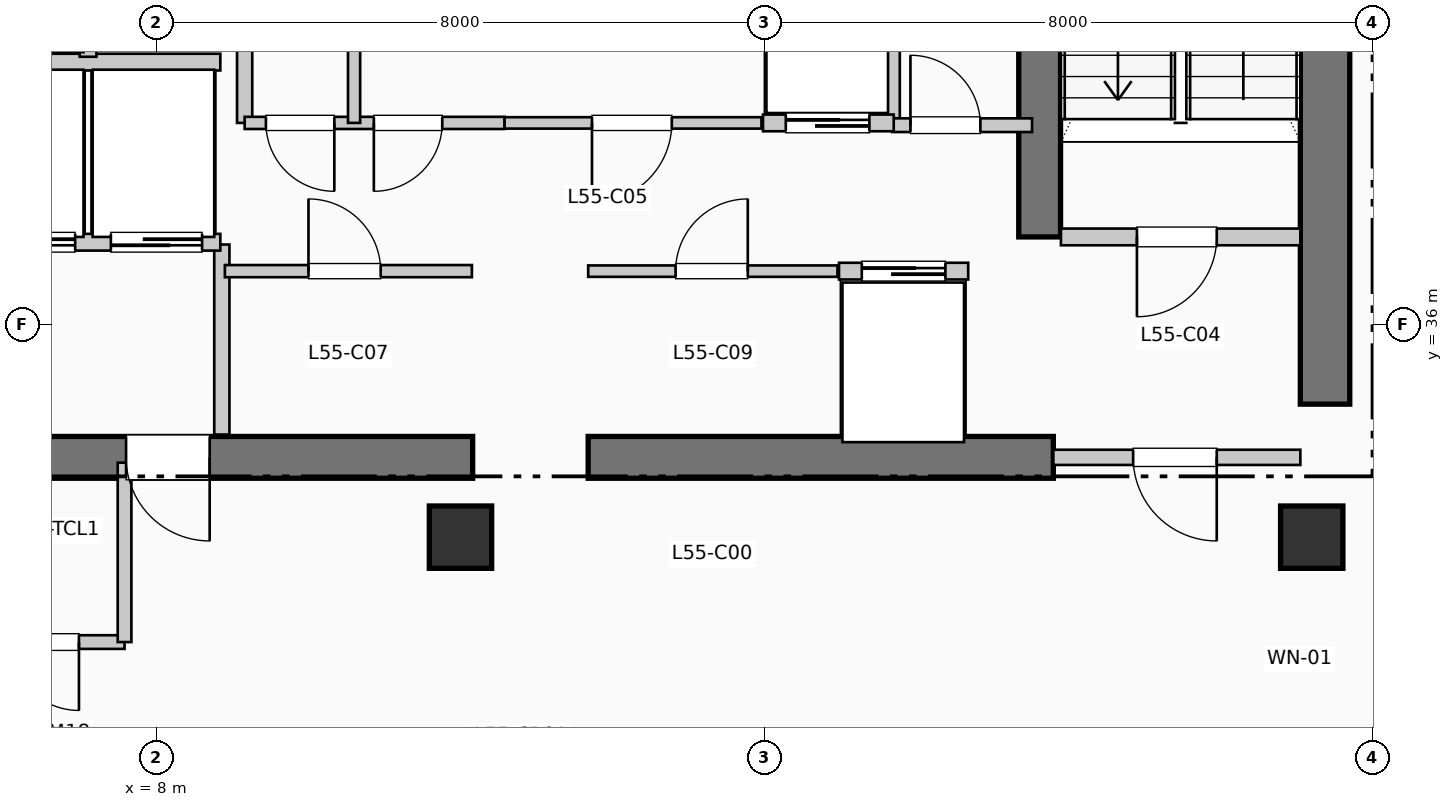
"""IFC4 building model, lengths in metres.
Left out: names, types, materials, properties, quantities, classifications, styles, units other than length and angle.
Written with IfcOpenShell. Run it as: python <this file> out.ifc"""

import sys

from ifc_helpers import new_model, si_unit, direction, frame, frame_2d, origin, origin_2d, place, context, subcontext, project, spatial, rectangle, extrude, element, fill, save


model = new_model("IFC4")
c1 = context("Model", 3, precision=1e-05, world=origin(), true_north=direction((0.0, 1.0)))
c2 = subcontext(c1, "Body", "Model", "MODEL_VIEW")
j1 = project(units=[si_unit("LENGTHUNIT", "METRE"), si_unit("PLANEANGLEUNIT", "RADIAN")], contexts=[c1])
p1 = place(None, origin())
s1 = spatial("IfcSite", under=j1, at=p1, CompositionType="ELEMENT")
p2 = place(p1, origin())
s2 = spatial("IfcBuilding", under=s1, at=p2, CompositionType="ELEMENT")
p3 = place(p2, frame((0.0, 0.0, 227.7)))
s3 = spatial("IfcBuildingStorey", under=s2, at=p3, CompositionType="ELEMENT", Elevation=227.7)
p4 = place(p3, frame((23.375, 34.95, 0.0), z_axis=(0.0, 0.0, 1.0), x_axis=(0.0, 1.0, 0.0)))
e1 = element("IfcWall", 1, at=p4, inside=s3, PredefinedType="SHEAR", context=c2, shape_type="SweptSolid", body=[
    extrude(rectangle(XDim=10.64, YDim=0.65, at=frame_2d((5.32, 0.0))), origin(), (0.0, 0.0, 1.0), 3.96),
])
p5 = place(p3, frame((1.45, 34.25, 0.0), z_axis=(0.0, 0.0, 1.0), x_axis=(1.0, 0.0, 0.0)))
e2 = element("IfcWall", 2, at=p5, inside=s3, PredefinedType="SHEAR", context=c2, shape_type="SweptSolid", body=[
    extrude(rectangle(XDim=10.71, YDim=0.55, at=frame_2d((5.355, 0.0))), origin(), (0.0, 0.0, 1.0), 3.96),
])
p6 = place(p5, frame((7.25, 0.0, 0.0), z_axis=(0.0, 0.0, 1.0), x_axis=(-1.0, 0.0, 0.0)))
e3 = element("IfcOpeningElement", 3, at=p6, cuts=e2, PredefinedType="OPENING", context=c2, shape_type="SweptSolid", body=[
    extrude(rectangle(XDim=1.1, YDim=2.15, at=frame_2d((0.55, 1.075))), frame((0.0, 0.285, 0.0), z_axis=(0.0, -1.0, 0.0), x_axis=(1.0, 0.0, 0.0)), (0.0, 0.0, 1.0), 0.57),
])
p7 = place(p3, frame((13.68, 34.25, 0.0), z_axis=(0.0, 0.0, 1.0), x_axis=(1.0, 0.0, 0.0)))
e4 = element("IfcWall", 4, at=p7, inside=s3, PredefinedType="SHEAR", context=c2, shape_type="SweptSolid", body=[
    extrude(rectangle(XDim=6.12, YDim=0.55, at=frame_2d((3.06, 0.0))), origin(), (0.0, 0.0, 1.0), 3.96),
])
p8 = place(p3, frame((19.62, 37.15, 0.0), z_axis=(0.0, 0.0, 1.0), x_axis=(0.0, 1.0, 0.0)))
e5 = element("IfcWall", 5, at=p8, inside=s3, PredefinedType="SHEAR", context=c2, shape_type="SweptSolid", body=[
    extrude(rectangle(XDim=7.89, YDim=0.55, at=frame_2d((3.945, 0.0))), origin(), (0.0, 0.0, 1.0), 3.96),
])
for number, where, z_axis, x_axis in (
    (6, (12.0, 33.2, 0.0), (0.0, 0.0, 1.0), (1.0, 0.0, 0.0)),
    (7, (23.2, 33.2, 0.0), (0.0, 0.0, 1.0), (1.0, 0.0, 0.0)),
):
    element("IfcColumn", number, at=place(p3, frame(where, z_axis=z_axis, x_axis=x_axis)), inside=s3, PredefinedType="COLUMN", context=c2, shape_type="SweptSolid", body=[
        extrude(rectangle(XDim=0.82, YDim=0.82, at=origin_2d()), origin(), (0.0, 0.0, 1.0), 3.96),
    ])
p9 = place(p3, frame((8.86, 34.55, 0.0), z_axis=(0.0, 0.0, 1.0), x_axis=(0.0, 1.0, 0.0)))
e8 = element("IfcWall", 8, at=p9, inside=s3, PredefinedType="PARTITIONING", context=c2, shape_type="SweptSolid", body=[
    extrude(rectangle(XDim=2.5, YDim=0.2, at=frame_2d((1.25, 0.0))), origin(), (0.0, 0.0, 1.0), 3.71),
])
p10 = place(p3, frame((19.9, 37.15, 0.0), z_axis=(0.0, 0.0, 1.0), x_axis=(1.0, 0.0, 0.0)))
e9 = element("IfcWall", 9, at=p10, inside=s3, PredefinedType="PARTITIONING", context=c2, shape_type="SweptSolid", body=[
    extrude(rectangle(XDim=3.15, YDim=0.22, at=frame_2d((1.575, 0.0))), origin(), (0.0, 0.0, 1.0), 3.71),
])
p11 = place(p10, frame((2.05, 0.0, 0.0), z_axis=(0.0, 0.0, 1.0), x_axis=(-1.0, 0.0, 0.0)))
e10 = element("IfcOpeningElement", 10, at=p11, cuts=e9, PredefinedType="OPENING", context=c2, shape_type="SweptSolid", body=[
    extrude(rectangle(XDim=1.05, YDim=2.15, at=frame_2d((0.525, 1.075))), frame((0.0, 0.12, 0.0), z_axis=(0.0, -1.0, 0.0), x_axis=(1.0, 0.0, 0.0)), (0.0, 0.0, 1.0), 0.24),
])
p12 = place(p3, frame((19.8, 34.25, 0.0), z_axis=(0.0, 0.0, 1.0), x_axis=(1.0, 0.0, 0.0)))
e11 = element("IfcWall", 11, at=p12, inside=s3, PredefinedType="PARTITIONING", context=c2, shape_type="SweptSolid", body=[
    extrude(rectangle(XDim=3.25, YDim=0.2, at=frame_2d((1.625, 0.0))), origin(), (0.0, 0.0, 1.0), 3.71),
])
p13 = place(p12, frame((2.15, 0.0, 0.0), z_axis=(0.0, 0.0, 1.0), x_axis=(-1.0, 0.0, 0.0)))
e12 = element("IfcOpeningElement", 12, at=p13, cuts=e11, PredefinedType="OPENING", context=c2, shape_type="SweptSolid", body=[
    extrude(rectangle(XDim=1.1, YDim=2.15, at=frame_2d((0.55, 1.075))), frame((0.0, 0.11, 0.0), z_axis=(0.0, -1.0, 0.0), x_axis=(1.0, 0.0, 0.0)), (0.0, 0.0, 1.0), 0.22),
])
p14 = place(p3, frame((5.38, 37.08, 0.0), z_axis=(0.0, 0.0, 1.0), x_axis=(1.0, 0.0, 0.0)))
e13 = element("IfcWall", 13, at=p14, inside=s3, PredefinedType="PARTITIONING", context=c2, shape_type="SweptSolid", body=[
    extrude(rectangle(XDim=3.46, YDim=0.22, at=frame_2d((1.73, 0.0))), origin(), (0.0, 0.0, 1.0), 3.71),
])
p15 = place(p14, frame((1.55, 0.0, 0.0), z_axis=(0.0, 0.0, 1.0), x_axis=(-1.0, 0.0, 0.0)))
e14 = element("IfcOpeningElement", 14, at=p15, cuts=e13, PredefinedType="OPENING", context=c2, shape_type="SweptSolid", body=[
    extrude(rectangle(XDim=1.2, YDim=2.2, at=frame_2d((0.6, 1.1))), frame((0.0, 0.12, 0.0), z_axis=(0.0, -1.0, 0.0), x_axis=(1.0, 0.0, 0.0)), (0.0, 0.0, 1.0), 0.24),
])
p16 = place(p14, frame((3.22, 0.0, 0.0), z_axis=(0.0, 0.0, 1.0), x_axis=(-1.0, 0.0, 0.0)))
e15 = element("IfcOpeningElement", 15, at=p16, cuts=e13, PredefinedType="OPENING", context=c2, shape_type="SweptSolid", body=[
    extrude(rectangle(XDim=1.2, YDim=2.2, at=frame_2d((0.6, 1.1))), frame((0.0, 0.12, 0.0), z_axis=(0.0, -1.0, 0.0), x_axis=(1.0, 0.0, 0.0)), (0.0, 0.0, 1.0), 0.24),
])
p17 = place(p3, frame((5.38, 39.45, 0.0), z_axis=(0.0, 0.0, 1.0), x_axis=(1.0, 0.0, 0.0)))
e16 = element("IfcWall", 16, at=p17, inside=s3, PredefinedType="PARTITIONING", context=c2, shape_type="SweptSolid", body=[
    extrude(rectangle(XDim=3.46, YDim=0.22, at=frame_2d((1.73, 0.0))), origin(), (0.0, 0.0, 1.0), 3.71),
])
p18 = place(p3, frame((7.1, 39.52, 0.0), z_axis=(0.0, 0.0, 1.0), x_axis=(0.0, 1.0, 0.0)))
e17 = element("IfcWall", 17, at=p18, inside=s3, PredefinedType="PARTITIONING", context=c2, shape_type="SweptSolid", body=[
    extrude(rectangle(XDim=2.93, YDim=0.22, at=frame_2d((1.465, 0.0))), origin(), (0.0, 0.0, 1.0), 3.71),
])
p19 = place(p18, frame((0.85, 0.0, 0.0)))
e18 = element("IfcOpeningElement", 18, at=p19, cuts=e17, PredefinedType="OPENING", context=c2, shape_type="SweptSolid", body=[
    extrude(rectangle(XDim=1.1, YDim=2.2, at=frame_2d((0.55, 1.1))), frame((0.0, 0.12, 0.0), z_axis=(0.0, -1.0, 0.0), x_axis=(1.0, 0.0, 0.0)), (0.0, 0.0, 1.0), 0.24),
])
for number, where, z_axis, x_axis in (
    (19, (9.16, 38.65, 0.0), (0.0, 0.0, 1.0), (0.0, 1.0, 0.0)),
    (20, (17.68, 38.65, 0.0), (0.0, 0.0, 1.0), (0.0, 1.0, 0.0)),
):
    element("IfcWall", number, at=place(p3, frame(where, z_axis=z_axis, x_axis=x_axis)), inside=s3, PredefinedType="PARTITIONING", context=c2, shape_type="SweptSolid", body=[
        extrude(rectangle(XDim=2.35, YDim=0.2, at=frame_2d((1.175, 0.0))), origin(), (0.0, 0.0, 1.0), 3.71),
    ])
p20 = place(p3, frame((17.68, 38.62, 0.0), z_axis=(0.0, 0.0, 1.0), x_axis=(1.0, 0.0, 0.0)))
e21 = element("IfcWall", 21, at=p20, inside=s3, PredefinedType="PARTITIONING", context=c2, shape_type="SweptSolid", body=[
    extrude(rectangle(XDim=1.84, YDim=0.18, at=frame_2d((0.92, 0.0))), origin(), (0.0, 0.0, 1.0), 3.71),
])
p21 = place(p20, frame((0.24, 0.0, 0.0)))
e22 = element("IfcOpeningElement", 22, at=p21, cuts=e21, PredefinedType="OPENING", context=c2, shape_type="SweptSolid", body=[
    extrude(rectangle(XDim=0.92, YDim=2.1, at=frame_2d((0.46, 1.05))), frame((0.0, 0.1, 0.0), z_axis=(0.0, -1.0, 0.0), x_axis=(1.0, 0.0, 0.0)), (0.0, 0.0, 1.0), 0.2),
])
p22 = place(p3, frame((5.5, 31.82, 0.0), z_axis=(0.0, 0.0, 1.0), x_axis=(1.0, 0.0, 0.0)))
e23 = element("IfcWall", 23, at=p22, inside=s3, PredefinedType="PLUMBINGWALL", context=c2, shape_type="SweptSolid", body=[
    extrude(rectangle(XDim=2.08, YDim=0.18, at=frame_2d((1.04, 0.0))), origin(), (0.0, 0.0, 1.0), 3.71),
])
p23 = place(p22, frame((1.48, 0.0, 0.0), z_axis=(0.0, 0.0, 1.0), x_axis=(-1.0, 0.0, 0.0)))
e24 = element("IfcOpeningElement", 24, at=p23, cuts=e23, PredefinedType="OPENING", context=c2, shape_type="SweptSolid", body=[
    extrude(rectangle(XDim=0.9, YDim=2.1, at=frame_2d((0.45, 1.05))), frame((0.0, 0.1, 0.0), z_axis=(0.0, -1.0, 0.0), x_axis=(1.0, 0.0, 0.0)), (0.0, 0.0, 1.0), 0.2),
])
p24 = place(p3, frame((7.58, 31.82, 0.0), z_axis=(0.0, 0.0, 1.0), x_axis=(0.0, 1.0, 0.0)))
e25 = element("IfcWall", 25, at=p24, inside=s3, PredefinedType="PLUMBINGWALL", context=c2, shape_type="SweptSolid", body=[
    extrude(rectangle(XDim=2.36, YDim=0.18, at=frame_2d((1.18, 0.0))), origin(), (0.0, 0.0, 1.0), 3.71),
])
p25 = place(p3, frame((8.9, 36.7, 0.0), z_axis=(0.0, 0.0, 1.0), x_axis=(1.0, 0.0, 0.0)))
e26 = element("IfcWall", 26, at=p25, inside=s3, PredefinedType="PARTITIONING", context=c2, shape_type="SweptSolid", body=[
    extrude(rectangle(XDim=3.25, YDim=0.16, at=frame_2d((1.625, 0.0))), origin(), (0.0, 0.0, 1.0), 3.71),
])
p26 = place(p25, frame((1.1, 0.0, 0.0)))
e27 = element("IfcOpeningElement", 27, at=p26, cuts=e26, PredefinedType="OPENING", context=c2, shape_type="SweptSolid", body=[
    extrude(rectangle(XDim=0.95, YDim=2.15, at=frame_2d((0.475, 1.075))), frame((0.0, 0.09, 0.0), z_axis=(0.0, -1.0, 0.0), x_axis=(1.0, 0.0, 0.0)), (0.0, 0.0, 1.0), 0.18),
])
p27 = place(p3, frame((9.16, 38.65, 0.0), z_axis=(0.0, 0.0, 1.0), x_axis=(1.0, 0.0, 0.0)))
e28 = element("IfcWall", 28, at=p27, inside=s3, PredefinedType="PARTITIONING", context=c2, shape_type="SweptSolid", body=[
    extrude(rectangle(XDim=3.42, YDim=0.16, at=frame_2d((1.71, 0.0))), origin(), (0.0, 0.0, 1.0), 3.71),
])
p28 = place(p27, frame((1.18, 0.0, 0.0), z_axis=(0.0, 0.0, 1.0), x_axis=(-1.0, 0.0, 0.0)))
e29 = element("IfcOpeningElement", 29, at=p28, cuts=e28, PredefinedType="OPENING", context=c2, shape_type="SweptSolid", body=[
    extrude(rectangle(XDim=0.9, YDim=2.15, at=frame_2d((0.45, 1.075))), frame((0.0, 0.09, 0.0), z_axis=(0.0, -1.0, 0.0), x_axis=(1.0, 0.0, 0.0)), (0.0, 0.0, 1.0), 0.18),
])
p29 = place(p27, frame((2.6, 0.0, 0.0), z_axis=(0.0, 0.0, 1.0), x_axis=(-1.0, 0.0, 0.0)))
e30 = element("IfcOpeningElement", 30, at=p29, cuts=e28, PredefinedType="OPENING", context=c2, shape_type="SweptSolid", body=[
    extrude(rectangle(XDim=0.9, YDim=2.15, at=frame_2d((0.45, 1.075))), frame((0.0, 0.09, 0.0), z_axis=(0.0, -1.0, 0.0), x_axis=(1.0, 0.0, 0.0)), (0.0, 0.0, 1.0), 0.18),
])
p30 = place(p3, frame((10.6, 38.65, 0.0), z_axis=(0.0, 0.0, 1.0), x_axis=(0.0, 1.0, 0.0)))
e31 = element("IfcWall", 31, at=p30, inside=s3, PredefinedType="PARTITIONING", context=c2, shape_type="SweptSolid", body=[
    extrude(rectangle(XDim=2.35, YDim=0.16, at=frame_2d((1.175, 0.0))), origin(), (0.0, 0.0, 1.0), 3.71),
])
p31 = place(p3, frame((13.68, 36.7, 0.0), z_axis=(0.0, 0.0, 1.0), x_axis=(1.0, 0.0, 0.0)))
e32 = element("IfcWall", 32, at=p31, inside=s3, PredefinedType="PARTITIONING", context=c2, shape_type="SweptSolid", body=[
    extrude(rectangle(XDim=3.28, YDim=0.15, at=frame_2d((1.64, 0.0))), origin(), (0.0, 0.0, 1.0), 3.71),
])
p32 = place(p31, frame((1.15, 0.0, 0.0)))
e33 = element("IfcOpeningElement", 33, at=p32, cuts=e32, PredefinedType="OPENING", context=c2, shape_type="SweptSolid", body=[
    extrude(rectangle(XDim=0.95, YDim=2.15, at=frame_2d((0.475, 1.075))), frame((0.0, 0.085, 0.0), z_axis=(0.0, -1.0, 0.0), x_axis=(1.0, 0.0, 0.0)), (0.0, 0.0, 1.0), 0.17),
])
p33 = place(p3, frame((12.58, 38.65, 0.0), z_axis=(0.0, 0.0, 1.0), x_axis=(1.0, 0.0, 0.0)))
e34 = element("IfcWall", 34, at=p33, inside=s3, PredefinedType="PARTITIONING", context=c2, shape_type="SweptSolid", body=[
    extrude(rectangle(XDim=3.38, YDim=0.15, at=frame_2d((1.69, 0.0))), origin(), (0.0, 0.0, 1.0), 3.71),
])
p34 = place(p33, frame((2.2, 0.0, 0.0), z_axis=(0.0, 0.0, 1.0), x_axis=(-1.0, 0.0, 0.0)))
e35 = element("IfcOpeningElement", 35, at=p34, cuts=e34, PredefinedType="OPENING", context=c2, shape_type="SweptSolid", body=[
    extrude(rectangle(XDim=1.05, YDim=2.15, at=frame_2d((0.525, 1.075))), frame((0.0, 0.085, 0.0), z_axis=(0.0, -1.0, 0.0), x_axis=(1.0, 0.0, 0.0)), (0.0, 0.0, 1.0), 0.17),
])
p35 = place(p3, frame((16.98, 36.7, 0.0), z_axis=(0.0, 0.0, 1.0), x_axis=(1.0, 0.0, 0.0)))
e36 = element("IfcWall", 36, at=p35, inside=s3, PredefinedType="PARTITIONING", context=c2, shape_type="SweptSolid", body=[
    extrude(rectangle(XDim=1.7, YDim=0.22, at=frame_2d((0.85, 0.0))), origin(), (0.0, 0.0, 1.0), 3.71),
])
p36 = place(p35, frame((0.3, 0.0, 0.0)))
e37 = element("IfcOpeningElement", 37, at=p36, cuts=e36, PredefinedType="OPENING", context=c2, shape_type="SweptSolid", body=[
    extrude(rectangle(XDim=1.1, YDim=2.2, at=frame_2d((0.55, 1.1))), frame((0.0, 0.12, 0.0), z_axis=(0.0, -1.0, 0.0), x_axis=(1.0, 0.0, 0.0)), (0.0, 0.0, 1.0), 0.24),
])
p37 = place(p3, frame((15.98, 38.65, 0.0), z_axis=(0.0, 0.0, 1.0), x_axis=(1.0, 0.0, 0.0)))
e38 = element("IfcWall", 38, at=p37, inside=s3, PredefinedType="PARTITIONING", context=c2, shape_type="SweptSolid", body=[
    extrude(rectangle(XDim=1.72, YDim=0.22, at=frame_2d((0.86, 0.0))), origin(), (0.0, 0.0, 1.0), 3.71),
])
p38 = place(p37, frame((0.3, 0.0, 0.0)))
e39 = element("IfcOpeningElement", 39, at=p38, cuts=e38, PredefinedType="OPENING", context=c2, shape_type="SweptSolid", body=[
    extrude(rectangle(XDim=1.1, YDim=2.2, at=frame_2d((0.55, 1.1))), frame((0.0, 0.12, 0.0), z_axis=(0.0, -1.0, 0.0), x_axis=(1.0, 0.0, 0.0)), (0.0, 0.0, 1.0), 0.24),
])
p39 = place(p6, origin())
e40 = element("IfcDoor", 40, at=p39, inside=s3, OperationType="SINGLE_SWING_RIGHT", PredefinedType="DOOR", context=c2, shape_type="SweptSolid", body=[
    extrude(rectangle(XDim=1.1, YDim=2.15, at=frame_2d((0.55, 1.075))), frame((0.0, 0.025, 0.0), z_axis=(0.0, -1.0, 0.0), x_axis=(1.0, 0.0, 0.0)), (0.0, 0.0, 1.0), 0.05),
])
fill(e3, e40)
p40 = place(p11, origin())
e41 = element("IfcDoor", 41, at=p40, inside=s3, OperationType="SINGLE_SWING_LEFT", PredefinedType="DOOR", context=c2, shape_type="SweptSolid", body=[
    extrude(rectangle(XDim=1.05, YDim=2.15, at=frame_2d((0.525, 1.075))), frame((0.0, 0.025, 0.0), z_axis=(0.0, -1.0, 0.0), x_axis=(1.0, 0.0, 0.0)), (0.0, 0.0, 1.0), 0.05),
])
fill(e10, e41)
p41 = place(p13, origin())
e42 = element("IfcDoor", 42, at=p41, inside=s3, OperationType="SINGLE_SWING_RIGHT", PredefinedType="DOOR", context=c2, shape_type="SweptSolid", body=[
    extrude(rectangle(XDim=1.1, YDim=2.15, at=frame_2d((0.55, 1.075))), frame((0.0, 0.025, 0.0), z_axis=(0.0, -1.0, 0.0), x_axis=(1.0, 0.0, 0.0)), (0.0, 0.0, 1.0), 0.05),
])
fill(e12, e42)
p42 = place(p15, origin())
e43 = element("IfcDoor", 43, at=p42, inside=s3, OperationType="SLIDING_TO_RIGHT", PredefinedType="DOOR", context=c2, shape_type="SweptSolid", body=[
    extrude(rectangle(XDim=1.2, YDim=2.2, at=frame_2d((0.6, 1.1))), frame((0.0, 0.025, 0.0), z_axis=(0.0, -1.0, 0.0), x_axis=(1.0, 0.0, 0.0)), (0.0, 0.0, 1.0), 0.05),
])
fill(e14, e43)
p43 = place(p16, origin())
e44 = element("IfcDoor", 44, at=p43, inside=s3, OperationType="SLIDING_TO_RIGHT", PredefinedType="DOOR", context=c2, shape_type="SweptSolid", body=[
    extrude(rectangle(XDim=1.2, YDim=2.2, at=frame_2d((0.6, 1.1))), frame((0.0, 0.025, 0.0), z_axis=(0.0, -1.0, 0.0), x_axis=(1.0, 0.0, 0.0)), (0.0, 0.0, 1.0), 0.05),
])
fill(e15, e44)
p44 = place(p21, origin())
e45 = element("IfcDoor", 45, at=p44, inside=s3, OperationType="SINGLE_SWING_LEFT", PredefinedType="DOOR", context=c2, shape_type="SweptSolid", body=[
    extrude(rectangle(XDim=0.92, YDim=2.1, at=frame_2d((0.46, 1.05))), frame((0.0, 0.025, 0.0), z_axis=(0.0, -1.0, 0.0), x_axis=(1.0, 0.0, 0.0)), (0.0, 0.0, 1.0), 0.05),
])
fill(e22, e45)
p45 = place(p23, origin())
e46 = element("IfcDoor", 46, at=p45, inside=s3, OperationType="SINGLE_SWING_RIGHT", PredefinedType="DOOR", context=c2, shape_type="SweptSolid", body=[
    extrude(rectangle(XDim=0.9, YDim=2.1, at=frame_2d((0.45, 1.05))), frame((0.0, 0.025, 0.0), z_axis=(0.0, -1.0, 0.0), x_axis=(1.0, 0.0, 0.0)), (0.0, 0.0, 1.0), 0.05),
])
fill(e24, e46)
p46 = place(p26, origin())
e47 = element("IfcDoor", 47, at=p46, inside=s3, OperationType="SINGLE_SWING_LEFT", PredefinedType="DOOR", context=c2, shape_type="SweptSolid", body=[
    extrude(rectangle(XDim=0.95, YDim=2.15, at=frame_2d((0.475, 1.075))), frame((0.0, 0.025, 0.0), z_axis=(0.0, -1.0, 0.0), x_axis=(1.0, 0.0, 0.0)), (0.0, 0.0, 1.0), 0.05),
])
fill(e27, e47)
p47 = place(p28, origin())
e48 = element("IfcDoor", 48, at=p47, inside=s3, OperationType="SINGLE_SWING_RIGHT", PredefinedType="DOOR", context=c2, shape_type="SweptSolid", body=[
    extrude(rectangle(XDim=0.9, YDim=2.15, at=frame_2d((0.45, 1.075))), frame((0.0, 0.025, 0.0), z_axis=(0.0, -1.0, 0.0), x_axis=(1.0, 0.0, 0.0)), (0.0, 0.0, 1.0), 0.05),
])
fill(e29, e48)
p48 = place(p29, origin())
e49 = element("IfcDoor", 49, at=p48, inside=s3, OperationType="SINGLE_SWING_LEFT", PredefinedType="DOOR", context=c2, shape_type="SweptSolid", body=[
    extrude(rectangle(XDim=0.9, YDim=2.15, at=frame_2d((0.45, 1.075))), frame((0.0, 0.025, 0.0), z_axis=(0.0, -1.0, 0.0), x_axis=(1.0, 0.0, 0.0)), (0.0, 0.0, 1.0), 0.05),
])
fill(e30, e49)
p49 = place(p32, origin())
e50 = element("IfcDoor", 50, at=p49, inside=s3, OperationType="SINGLE_SWING_RIGHT", PredefinedType="DOOR", context=c2, shape_type="SweptSolid", body=[
    extrude(rectangle(XDim=0.95, YDim=2.15, at=frame_2d((0.475, 1.075))), frame((0.0, 0.025, 0.0), z_axis=(0.0, -1.0, 0.0), x_axis=(1.0, 0.0, 0.0)), (0.0, 0.0, 1.0), 0.05),
])
fill(e33, e50)
p50 = place(p34, origin())
e51 = element("IfcDoor", 51, at=p50, inside=s3, OperationType="SINGLE_SWING_LEFT", PredefinedType="DOOR", context=c2, shape_type="SweptSolid", body=[
    extrude(rectangle(XDim=1.05, YDim=2.15, at=frame_2d((0.525, 1.075))), frame((0.0, 0.025, 0.0), z_axis=(0.0, -1.0, 0.0), x_axis=(1.0, 0.0, 0.0)), (0.0, 0.0, 1.0), 0.05),
])
fill(e35, e51)
p51 = place(p36, origin())
e52 = element("IfcDoor", 52, at=p51, inside=s3, OperationType="SLIDING_TO_LEFT", PredefinedType="DOOR", context=c2, shape_type="SweptSolid", body=[
    extrude(rectangle(XDim=1.1, YDim=2.2, at=frame_2d((0.55, 1.1))), frame((0.0, 0.025, 0.0), z_axis=(0.0, -1.0, 0.0), x_axis=(1.0, 0.0, 0.0)), (0.0, 0.0, 1.0), 0.05),
])
fill(e37, e52)
p52 = place(p38, origin())
e53 = element("IfcDoor", 53, at=p52, inside=s3, OperationType="SLIDING_TO_LEFT", PredefinedType="DOOR", context=c2, shape_type="SweptSolid", body=[
    extrude(rectangle(XDim=1.1, YDim=2.2, at=frame_2d((0.55, 1.1))), frame((0.0, 0.025, 0.0), z_axis=(0.0, -1.0, 0.0), x_axis=(1.0, 0.0, 0.0)), (0.0, 0.0, 1.0), 0.05),
])
fill(e39, e53)
save(model, sys.argv[1])
